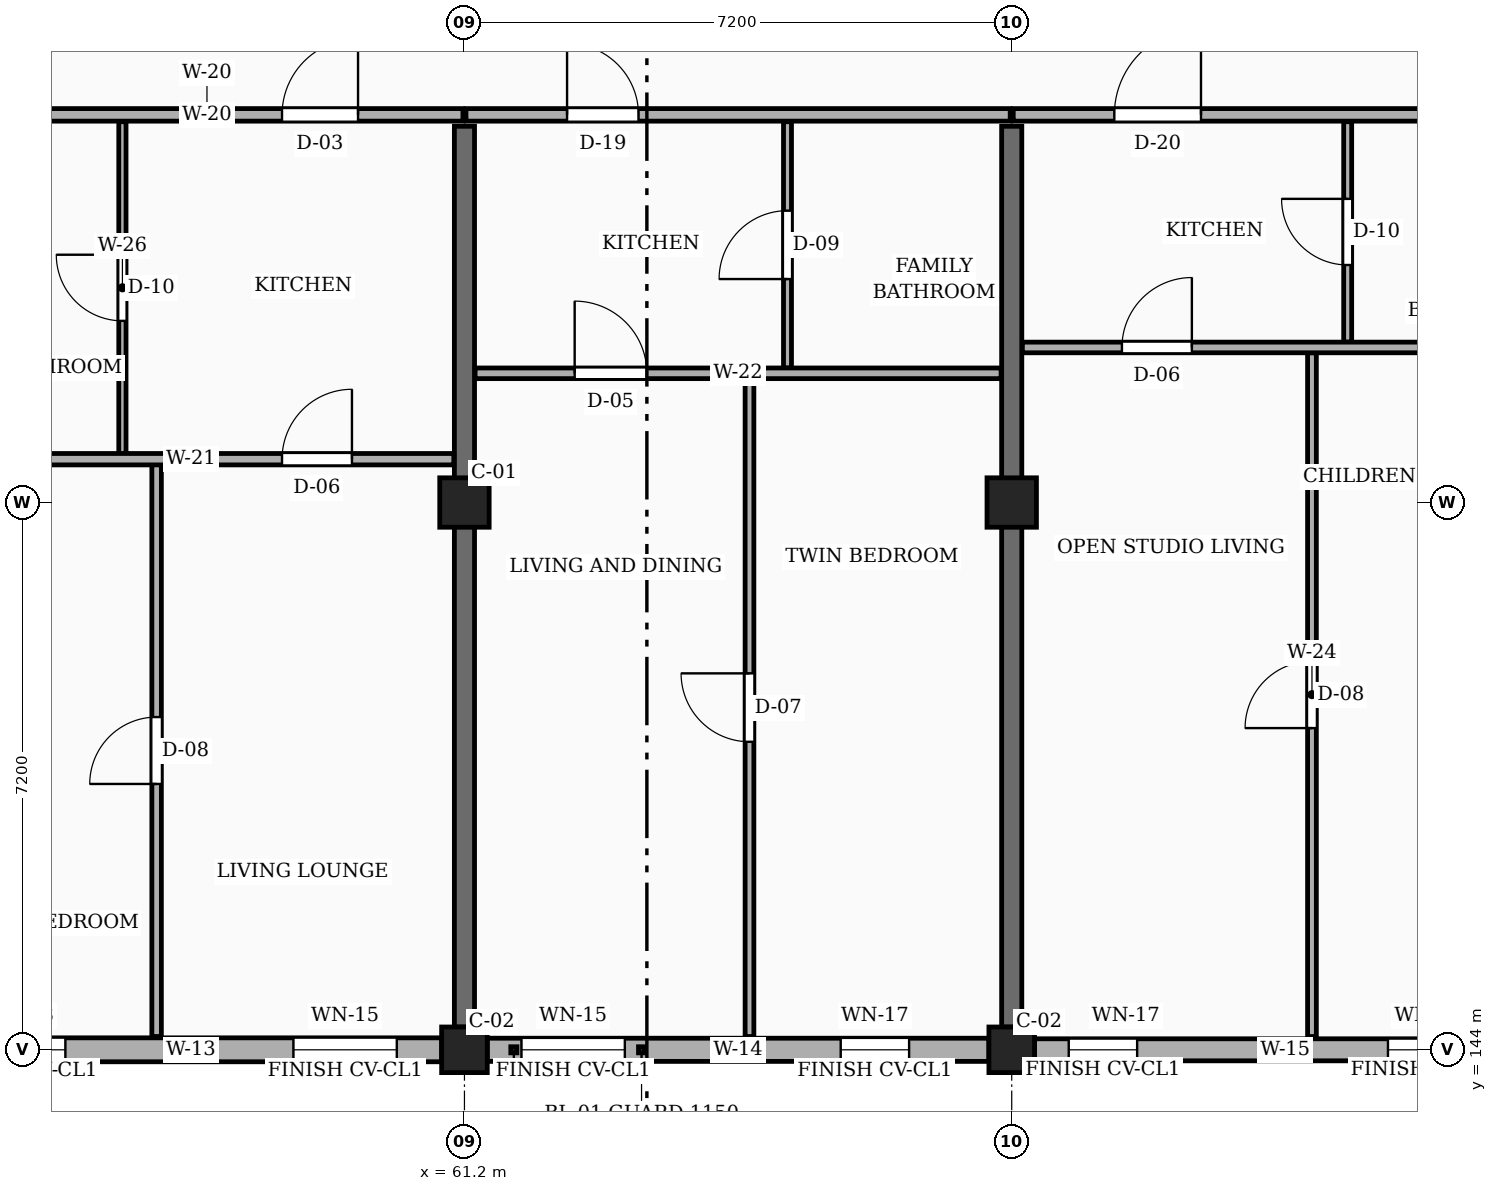
"""IFC4 building model, lengths in metres.
Left out: names, types, materials, properties, quantities, classifications, styles, units other than length and angle.
Written with IfcOpenShell. Run it as: python <this file> out.ifc"""

import sys

from ifc_helpers import new_model, si_unit, direction, frame, frame_2d, origin, origin_2d, place, context, subcontext, project, spatial, rectangle, extrude, element, fill, save


model = new_model("IFC4")
c1 = context("Model", 3, precision=1e-05, world=origin(), true_north=direction((0.0, 1.0)))
c2 = subcontext(c1, "Body", "Model", "MODEL_VIEW")
j1 = project(units=[si_unit("LENGTHUNIT", "METRE"), si_unit("PLANEANGLEUNIT", "RADIAN")], contexts=[c1])
p1 = place(None, origin())
s1 = spatial("IfcSite", under=j1, at=p1, CompositionType="ELEMENT")
p2 = place(p1, origin())
s2 = spatial("IfcBuilding", under=s1, at=p2, CompositionType="ELEMENT")
p3 = place(p2, frame((0.0, 0.0, 7.65)))
s3 = spatial("IfcBuildingStorey", under=s2, at=p3, CompositionType="ELEMENT", Elevation=7.65)
p4 = place(p3, frame((61.2, 144.0, 0.0), z_axis=(0.0, 0.0, 1.0), x_axis=(1.0, 0.0, 0.0)))
e1 = element("IfcColumn", 1, at=p4, inside=s3, PredefinedType="COLUMN", context=c2, shape_type="SweptSolid", body=[
    extrude(rectangle(XDim=0.6, YDim=0.6, at=origin_2d()), origin(), (0.0, 0.0, 1.0), 3.15),
])
p5 = place(p3, frame((61.2, 151.2, 0.0), z_axis=(0.0, 0.0, 1.0), x_axis=(1.0, 0.0, 0.0)))
e2 = element("IfcColumn", 2, at=p5, inside=s3, PredefinedType="COLUMN", context=c2, shape_type="SweptSolid", body=[
    extrude(rectangle(XDim=0.65, YDim=0.65, at=origin_2d()), origin(), (0.0, 0.0, 1.0), 3.15),
])
p6 = place(p3, frame((68.4, 144.0, 0.0), z_axis=(0.0, 0.0, 1.0), x_axis=(1.0, 0.0, 0.0)))
e3 = element("IfcColumn", 3, at=p6, inside=s3, PredefinedType="COLUMN", context=c2, shape_type="SweptSolid", body=[
    extrude(rectangle(XDim=0.6, YDim=0.6, at=origin_2d()), origin(), (0.0, 0.0, 1.0), 3.15),
])
p7 = place(p3, frame((68.4, 151.2, 0.0), z_axis=(0.0, 0.0, 1.0), x_axis=(1.0, 0.0, 0.0)))
e4 = element("IfcColumn", 4, at=p7, inside=s3, PredefinedType="COLUMN", context=c2, shape_type="SweptSolid", body=[
    extrude(rectangle(XDim=0.65, YDim=0.65, at=origin_2d()), origin(), (0.0, 0.0, 1.0), 3.15),
])
for number, where, z_axis, x_axis in (
    (5, (61.2, 144.3, 0.0), (0.0, 0.0, 1.0), (0.0, 1.0, 0.0)),
    (6, (68.4, 144.3, 0.0), (0.0, 0.0, 1.0), (0.0, 1.0, 0.0)),
):
    element("IfcWall", number, at=place(p3, frame(where, z_axis=z_axis, x_axis=x_axis)), inside=s3, PredefinedType="SOLIDWALL", context=c2, shape_type="SweptSolid", body=[
        extrude(rectangle(XDim=11.85, YDim=0.265, at=frame_2d((5.925, 0.0))), origin(), (0.0, 0.0, 1.0), 2.185),
    ])
p8 = place(p3, frame((54.3, 144.0, 0.0), z_axis=(0.0, 0.0, 1.0), x_axis=(1.0, 0.0, 0.0)))
e7 = element("IfcWall", 7, at=p8, inside=s3, PredefinedType="SOLIDWALL", context=c2, shape_type="SweptSolid", body=[
    extrude(rectangle(XDim=6.6, YDim=0.315, at=frame_2d((3.3, 0.0))), origin(), (0.0, 0.0, 1.0), 2.455),
])
p9 = place(p8, frame((0.45, 0.0, 0.78)))
e8 = element("IfcOpeningElement", 8, at=p9, cuts=e7, PredefinedType="OPENING", context=c2, shape_type="SweptSolid", body=[
    extrude(rectangle(XDim=1.2, YDim=1.26, at=frame_2d((0.6, 0.63))), frame((0.0, 0.167, 0.0), z_axis=(0.0, -1.0, 0.0), x_axis=(1.0, 0.0, 0.0)), (0.0, 0.0, 1.0), 0.335),
])
p10 = place(p8, frame((4.65, 0.0, 0.78)))
e9 = element("IfcOpeningElement", 9, at=p10, cuts=e7, PredefinedType="OPENING", context=c2, shape_type="SweptSolid", body=[
    extrude(rectangle(XDim=1.36, YDim=1.26, at=frame_2d((0.68, 0.63))), frame((0.0, 0.167, 0.0), z_axis=(0.0, -1.0, 0.0), x_axis=(1.0, 0.0, 0.0)), (0.0, 0.0, 1.0), 0.335),
])
p11 = place(p3, frame((61.5, 144.0, 0.0), z_axis=(0.0, 0.0, 1.0), x_axis=(1.0, 0.0, 0.0)))
e10 = element("IfcWall", 10, at=p11, inside=s3, PredefinedType="SOLIDWALL", context=c2, shape_type="SweptSolid", body=[
    extrude(rectangle(XDim=6.6, YDim=0.305, at=frame_2d((3.3, 0.0))), origin(), (0.0, 0.0, 1.0), 2.455),
])
p12 = place(p11, frame((0.45, 0.0, 0.78)))
e11 = element("IfcOpeningElement", 11, at=p12, cuts=e10, PredefinedType="OPENING", context=c2, shape_type="SweptSolid", body=[
    extrude(rectangle(XDim=1.36, YDim=1.26, at=frame_2d((0.68, 0.63))), frame((0.0, 0.163, 0.0), z_axis=(0.0, -1.0, 0.0), x_axis=(1.0, 0.0, 0.0)), (0.0, 0.0, 1.0), 0.325),
])
p13 = place(p11, frame((4.65, 0.0, 0.78)))
e12 = element("IfcOpeningElement", 12, at=p13, cuts=e10, PredefinedType="OPENING", context=c2, shape_type="SweptSolid", body=[
    extrude(rectangle(XDim=0.9, YDim=1.36, at=frame_2d((0.45, 0.68))), frame((0.0, 0.163, 0.0), z_axis=(0.0, -1.0, 0.0), x_axis=(1.0, 0.0, 0.0)), (0.0, 0.0, 1.0), 0.325),
])
p14 = place(p3, frame((68.7, 144.0, 0.0), z_axis=(0.0, 0.0, 1.0), x_axis=(1.0, 0.0, 0.0)))
e13 = element("IfcWall", 13, at=p14, inside=s3, PredefinedType="SOLIDWALL", context=c2, shape_type="SweptSolid", body=[
    extrude(rectangle(XDim=6.6, YDim=0.29, at=frame_2d((3.3, 0.0))), origin(), (0.0, 0.0, 1.0), 2.455),
])
p15 = place(p14, frame((0.45, 0.0, 0.78)))
e14 = element("IfcOpeningElement", 14, at=p15, cuts=e13, PredefinedType="OPENING", context=c2, shape_type="SweptSolid", body=[
    extrude(rectangle(XDim=0.9, YDim=1.36, at=frame_2d((0.45, 0.68))), frame((0.0, 0.155, 0.0), z_axis=(0.0, -1.0, 0.0), x_axis=(1.0, 0.0, 0.0)), (0.0, 0.0, 1.0), 0.31),
])
p16 = place(p14, frame((4.65, 0.0, 0.78)))
e15 = element("IfcOpeningElement", 15, at=p16, cuts=e13, PredefinedType="OPENING", context=c2, shape_type="SweptSolid", body=[
    extrude(rectangle(XDim=1.06, YDim=1.36, at=frame_2d((0.53, 0.68))), frame((0.0, 0.155, 0.0), z_axis=(0.0, -1.0, 0.0), x_axis=(1.0, 0.0, 0.0)), (0.0, 0.0, 1.0), 0.31),
])
p17 = place(p3, frame((54.02, 156.3, 0.0), z_axis=(0.0, 0.0, 1.0), x_axis=(1.0, 0.0, 0.0)))
e16 = element("IfcWall", 16, at=p17, inside=s3, PredefinedType="PARTITIONING", context=c2, shape_type="SweptSolid", body=[
    extrude(rectangle(XDim=7.16, YDim=0.165, at=frame_2d((3.58, 0.0))), origin(), (0.0, 0.0, 1.0), 2.32),
])
p18 = place(p17, frame((4.78, 0.0, 0.0)))
e17 = element("IfcOpeningElement", 17, at=p18, cuts=e16, PredefinedType="OPENING", context=c2, shape_type="SweptSolid", body=[
    extrude(rectangle(XDim=1.0, YDim=2.15, at=frame_2d((0.5, 1.075))), frame((0.0, 0.093, 0.0), z_axis=(0.0, -1.0, 0.0), x_axis=(1.0, 0.0, 0.0)), (0.0, 0.0, 1.0), 0.185),
])
p19 = place(p3, frame((61.22, 156.3, 0.0), z_axis=(0.0, 0.0, 1.0), x_axis=(1.0, 0.0, 0.0)))
e18 = element("IfcWall", 18, at=p19, inside=s3, PredefinedType="PARTITIONING", context=c2, shape_type="SweptSolid", body=[
    extrude(rectangle(XDim=7.16, YDim=0.165, at=frame_2d((3.58, 0.0))), origin(), (0.0, 0.0, 1.0), 2.32),
])
p20 = place(p19, frame((1.33, 0.0, 0.0)))
e19 = element("IfcOpeningElement", 19, at=p20, cuts=e18, PredefinedType="OPENING", context=c2, shape_type="SweptSolid", body=[
    extrude(rectangle(XDim=0.94, YDim=2.12, at=frame_2d((0.47, 1.06))), frame((0.0, 0.093, 0.0), z_axis=(0.0, -1.0, 0.0), x_axis=(1.0, 0.0, 0.0)), (0.0, 0.0, 1.0), 0.185),
])
p21 = place(p3, frame((68.42, 156.3, 0.0), z_axis=(0.0, 0.0, 1.0), x_axis=(1.0, 0.0, 0.0)))
e20 = element("IfcWall", 20, at=p21, inside=s3, PredefinedType="PARTITIONING", context=c2, shape_type="SweptSolid", body=[
    extrude(rectangle(XDim=7.005, YDim=0.165, at=frame_2d((3.502, 0.0))), origin(), (0.0, 0.0, 1.0), 2.32),
])
p22 = place(p21, frame((1.33, 0.0, 0.0)))
e21 = element("IfcOpeningElement", 21, at=p22, cuts=e20, PredefinedType="OPENING", context=c2, shape_type="SweptSolid", body=[
    extrude(rectangle(XDim=1.14, YDim=2.18, at=frame_2d((0.57, 1.09))), frame((0.0, 0.093, 0.0), z_axis=(0.0, -1.0, 0.0), x_axis=(1.0, 0.0, 0.0)), (0.0, 0.0, 1.0), 0.185),
])
p23 = place(p3, frame((57.15, 144.175, 0.0), z_axis=(0.0, 0.0, 1.0), x_axis=(0.0, 1.0, 0.0)))
e22 = element("IfcWall", 22, at=p23, inside=s3, PredefinedType="PARTITIONING", context=c2, shape_type="SweptSolid", body=[
    extrude(rectangle(XDim=7.525, YDim=0.125, at=frame_2d((3.762, 0.0))), origin(), (0.0, 0.0, 1.0), 2.32),
])
p24 = place(p23, frame((3.323, 0.0, 0.0)))
e23 = element("IfcOpeningElement", 23, at=p24, cuts=e22, PredefinedType="OPENING", context=c2, shape_type="SweptSolid", body=[
    extrude(rectangle(XDim=0.88, YDim=2.08, at=frame_2d((0.44, 1.04))), frame((0.0, 0.073, 0.0), z_axis=(0.0, -1.0, 0.0), x_axis=(1.0, 0.0, 0.0)), (0.0, 0.0, 1.0), 0.145),
])
p25 = place(p3, frame((56.7, 151.84, 0.0), z_axis=(0.0, 0.0, 1.0), x_axis=(0.0, 1.0, 0.0)))
e24 = element("IfcWall", 24, at=p25, inside=s3, PredefinedType="PARTITIONING", context=c2, shape_type="SweptSolid", body=[
    extrude(rectangle(XDim=4.37, YDim=0.095, at=frame_2d((2.185, 0.0))), origin(), (0.0, 0.0, 1.0), 2.32),
])
p26 = place(p25, frame((1.75, 0.0, 0.0)))
e25 = element("IfcOpeningElement", 25, at=p26, cuts=e24, PredefinedType="OPENING", context=c2, shape_type="SweptSolid", body=[
    extrude(rectangle(XDim=0.87, YDim=2.05, at=frame_2d((0.435, 1.025))), frame((0.0, 0.058, 0.0), z_axis=(0.0, -1.0, 0.0), x_axis=(1.0, 0.0, 0.0)), (0.0, 0.0, 1.0), 0.115),
])
p27 = place(p3, frame((54.14, 151.77, 0.0), z_axis=(0.0, 0.0, 1.0), x_axis=(1.0, 0.0, 0.0)))
e26 = element("IfcWall", 26, at=p27, inside=s3, PredefinedType="PARTITIONING", context=c2, shape_type="SweptSolid", body=[
    extrude(rectangle(XDim=6.92, YDim=0.15, at=frame_2d((3.46, 0.0))), origin(), (0.0, 0.0, 1.0), 2.32),
])
p28 = place(p27, frame((4.66, 0.0, 0.0)))
e27 = element("IfcOpeningElement", 27, at=p28, cuts=e26, PredefinedType="OPENING", context=c2, shape_type="SweptSolid", body=[
    extrude(rectangle(XDim=0.92, YDim=2.1, at=frame_2d((0.46, 1.05))), frame((0.0, 0.085, 0.0), z_axis=(0.0, -1.0, 0.0), x_axis=(1.0, 0.0, 0.0)), (0.0, 0.0, 1.0), 0.17),
])
p29 = place(p3, frame((64.95, 144.175, 0.0), z_axis=(0.0, 0.0, 1.0), x_axis=(0.0, 1.0, 0.0)))
e28 = element("IfcWall", 28, at=p29, inside=s3, PredefinedType="PARTITIONING", context=c2, shape_type="SweptSolid", body=[
    extrude(rectangle(XDim=8.655, YDim=0.115, at=frame_2d((4.328, 0.0))), origin(), (0.0, 0.0, 1.0), 2.32),
])
p30 = place(p29, frame((3.877, 0.0, 0.0)))
e29 = element("IfcOpeningElement", 29, at=p30, cuts=e28, PredefinedType="OPENING", context=c2, shape_type="SweptSolid", body=[
    extrude(rectangle(XDim=0.9, YDim=2.1, at=frame_2d((0.45, 1.05))), frame((0.0, 0.067, 0.0), z_axis=(0.0, -1.0, 0.0), x_axis=(1.0, 0.0, 0.0)), (0.0, 0.0, 1.0), 0.135),
])
p31 = place(p3, frame((65.45, 152.97, 0.0), z_axis=(0.0, 0.0, 1.0), x_axis=(0.0, 1.0, 0.0)))
e30 = element("IfcWall", 30, at=p31, inside=s3, PredefinedType="PARTITIONING", context=c2, shape_type="SweptSolid", body=[
    extrude(rectangle(XDim=3.24, YDim=0.105, at=frame_2d((1.62, 0.0))), origin(), (0.0, 0.0, 1.0), 2.32),
])
p32 = place(p31, frame((1.17, 0.0, 0.0)))
e31 = element("IfcOpeningElement", 31, at=p32, cuts=e30, PredefinedType="OPENING", context=c2, shape_type="SweptSolid", body=[
    extrude(rectangle(XDim=0.9, YDim=2.05, at=frame_2d((0.45, 1.025))), frame((0.0, 0.062, 0.0), z_axis=(0.0, -1.0, 0.0), x_axis=(1.0, 0.0, 0.0)), (0.0, 0.0, 1.0), 0.125),
])
p33 = place(p3, frame((61.34, 152.9, 0.0), z_axis=(0.0, 0.0, 1.0), x_axis=(1.0, 0.0, 0.0)))
e32 = element("IfcWall", 32, at=p33, inside=s3, PredefinedType="PARTITIONING", context=c2, shape_type="SweptSolid", body=[
    extrude(rectangle(XDim=6.92, YDim=0.14, at=frame_2d((3.46, 0.0))), origin(), (0.0, 0.0, 1.0), 2.32),
])
p34 = place(p33, frame((1.31, 0.0, 0.0)))
e33 = element("IfcOpeningElement", 33, at=p34, cuts=e32, PredefinedType="OPENING", context=c2, shape_type="SweptSolid", body=[
    extrude(rectangle(XDim=0.95, YDim=2.1, at=frame_2d((0.475, 1.05))), frame((0.0, 0.08, 0.0), z_axis=(0.0, -1.0, 0.0), x_axis=(1.0, 0.0, 0.0)), (0.0, 0.0, 1.0), 0.16),
])
p35 = place(p3, frame((72.35, 144.175, 0.0), z_axis=(0.0, 0.0, 1.0), x_axis=(0.0, 1.0, 0.0)))
e34 = element("IfcWall", 34, at=p35, inside=s3, PredefinedType="PARTITIONING", context=c2, shape_type="SweptSolid", body=[
    extrude(rectangle(XDim=8.995, YDim=0.115, at=frame_2d((4.498, 0.0))), origin(), (0.0, 0.0, 1.0), 2.32),
])
p36 = place(p35, frame((4.058, 0.0, 0.0)))
e35 = element("IfcOpeningElement", 35, at=p36, cuts=e34, PredefinedType="OPENING", context=c2, shape_type="SweptSolid", body=[
    extrude(rectangle(XDim=0.88, YDim=2.08, at=frame_2d((0.44, 1.04))), frame((0.0, 0.067, 0.0), z_axis=(0.0, -1.0, 0.0), x_axis=(1.0, 0.0, 0.0)), (0.0, 0.0, 1.0), 0.135),
])
p37 = place(p3, frame((72.82, 153.31, 0.0), z_axis=(0.0, 0.0, 1.0), x_axis=(0.0, 1.0, 0.0)))
e36 = element("IfcWall", 36, at=p37, inside=s3, PredefinedType="PARTITIONING", context=c2, shape_type="SweptSolid", body=[
    extrude(rectangle(XDim=2.9, YDim=0.105, at=frame_2d((1.45, 0.0))), origin(), (0.0, 0.0, 1.0), 2.32),
])
p38 = place(p37, frame((1.015, 0.0, 0.0)))
e37 = element("IfcOpeningElement", 37, at=p38, cuts=e36, PredefinedType="OPENING", context=c2, shape_type="SweptSolid", body=[
    extrude(rectangle(XDim=0.87, YDim=2.05, at=frame_2d((0.435, 1.025))), frame((0.0, 0.062, 0.0), z_axis=(0.0, -1.0, 0.0), x_axis=(1.0, 0.0, 0.0)), (0.0, 0.0, 1.0), 0.125),
])
p39 = place(p3, frame((68.54, 153.24, 0.0), z_axis=(0.0, 0.0, 1.0), x_axis=(1.0, 0.0, 0.0)))
e38 = element("IfcWall", 38, at=p39, inside=s3, PredefinedType="PARTITIONING", context=c2, shape_type="SweptSolid", body=[
    extrude(rectangle(XDim=6.885, YDim=0.14, at=frame_2d((3.442, 0.0))), origin(), (0.0, 0.0, 1.0), 2.32),
])
p40 = place(p39, frame((1.31, 0.0, 0.0)))
e39 = element("IfcOpeningElement", 39, at=p40, cuts=e38, PredefinedType="OPENING", context=c2, shape_type="SweptSolid", body=[
    extrude(rectangle(XDim=0.92, YDim=2.1, at=frame_2d((0.46, 1.05))), frame((0.0, 0.08, 0.0), z_axis=(0.0, -1.0, 0.0), x_axis=(1.0, 0.0, 0.0)), (0.0, 0.0, 1.0), 0.16),
])
p41 = place(p9, origin())
e40 = element("IfcWindow", 40, at=p41, inside=s3, PartitioningType="SINGLE_PANEL", PredefinedType="WINDOW", context=c2, shape_type="SweptSolid", body=[
    extrude(rectangle(XDim=1.2, YDim=1.26, at=frame_2d((0.6, 0.63))), frame((0.0, 0.03, 0.0), z_axis=(0.0, -1.0, 0.0), x_axis=(1.0, 0.0, 0.0)), (0.0, 0.0, 1.0), 0.06),
])
fill(e8, e40)
p42 = place(p10, origin())
e41 = element("IfcWindow", 41, at=p42, inside=s3, PartitioningType="SINGLE_PANEL", PredefinedType="WINDOW", context=c2, shape_type="SweptSolid", body=[
    extrude(rectangle(XDim=1.36, YDim=1.26, at=frame_2d((0.68, 0.63))), frame((0.0, 0.03, 0.0), z_axis=(0.0, -1.0, 0.0), x_axis=(1.0, 0.0, 0.0)), (0.0, 0.0, 1.0), 0.06),
])
fill(e9, e41)
p43 = place(p12, origin())
e42 = element("IfcWindow", 42, at=p43, inside=s3, PartitioningType="SINGLE_PANEL", PredefinedType="WINDOW", context=c2, shape_type="SweptSolid", body=[
    extrude(rectangle(XDim=1.36, YDim=1.26, at=frame_2d((0.68, 0.63))), frame((0.0, 0.03, 0.0), z_axis=(0.0, -1.0, 0.0), x_axis=(1.0, 0.0, 0.0)), (0.0, 0.0, 1.0), 0.06),
])
fill(e11, e42)
p44 = place(p13, origin())
e43 = element("IfcWindow", 43, at=p44, inside=s3, PartitioningType="SINGLE_PANEL", PredefinedType="WINDOW", context=c2, shape_type="SweptSolid", body=[
    extrude(rectangle(XDim=0.9, YDim=1.36, at=frame_2d((0.45, 0.68))), frame((0.0, 0.03, 0.0), z_axis=(0.0, -1.0, 0.0), x_axis=(1.0, 0.0, 0.0)), (0.0, 0.0, 1.0), 0.06),
])
fill(e12, e43)
p45 = place(p15, origin())
e44 = element("IfcWindow", 44, at=p45, inside=s3, PartitioningType="SINGLE_PANEL", PredefinedType="WINDOW", context=c2, shape_type="SweptSolid", body=[
    extrude(rectangle(XDim=0.9, YDim=1.36, at=frame_2d((0.45, 0.68))), frame((0.0, 0.03, 0.0), z_axis=(0.0, -1.0, 0.0), x_axis=(1.0, 0.0, 0.0)), (0.0, 0.0, 1.0), 0.06),
])
fill(e14, e44)
p46 = place(p16, origin())
e45 = element("IfcWindow", 45, at=p46, inside=s3, PartitioningType="SINGLE_PANEL", PredefinedType="WINDOW", context=c2, shape_type="SweptSolid", body=[
    extrude(rectangle(XDim=1.06, YDim=1.36, at=frame_2d((0.53, 0.68))), frame((0.0, 0.03, 0.0), z_axis=(0.0, -1.0, 0.0), x_axis=(1.0, 0.0, 0.0)), (0.0, 0.0, 1.0), 0.06),
])
fill(e15, e45)
p47 = place(p18, origin())
e46 = element("IfcDoor", 46, at=p47, inside=s3, OperationType="SINGLE_SWING_RIGHT", PredefinedType="DOOR", context=c2, shape_type="SweptSolid", body=[
    extrude(rectangle(XDim=1.0, YDim=2.15, at=frame_2d((0.5, 1.075))), frame((0.0, 0.025, 0.0), z_axis=(0.0, -1.0, 0.0), x_axis=(1.0, 0.0, 0.0)), (0.0, 0.0, 1.0), 0.05),
])
fill(e17, e46)
p48 = place(p20, origin())
e47 = element("IfcDoor", 47, at=p48, inside=s3, OperationType="SINGLE_SWING_LEFT", PredefinedType="DOOR", context=c2, shape_type="SweptSolid", body=[
    extrude(rectangle(XDim=0.94, YDim=2.12, at=frame_2d((0.47, 1.06))), frame((0.0, 0.025, 0.0), z_axis=(0.0, -1.0, 0.0), x_axis=(1.0, 0.0, 0.0)), (0.0, 0.0, 1.0), 0.05),
])
fill(e19, e47)
p49 = place(p22, origin())
e48 = element("IfcDoor", 48, at=p49, inside=s3, OperationType="SINGLE_SWING_RIGHT", PredefinedType="DOOR", context=c2, shape_type="SweptSolid", body=[
    extrude(rectangle(XDim=1.14, YDim=2.18, at=frame_2d((0.57, 1.09))), frame((0.0, 0.025, 0.0), z_axis=(0.0, -1.0, 0.0), x_axis=(1.0, 0.0, 0.0)), (0.0, 0.0, 1.0), 0.05),
])
fill(e21, e48)
p50 = place(p24, origin())
e49 = element("IfcDoor", 49, at=p50, inside=s3, OperationType="SINGLE_SWING_LEFT", PredefinedType="DOOR", context=c2, shape_type="SweptSolid", body=[
    extrude(rectangle(XDim=0.88, YDim=2.08, at=frame_2d((0.44, 1.04))), frame((0.0, 0.025, 0.0), z_axis=(0.0, -1.0, 0.0), x_axis=(1.0, 0.0, 0.0)), (0.0, 0.0, 1.0), 0.05),
])
fill(e23, e49)
p51 = place(p26, origin())
e50 = element("IfcDoor", 50, at=p51, inside=s3, OperationType="SINGLE_SWING_RIGHT", PredefinedType="DOOR", context=c2, shape_type="SweptSolid", body=[
    extrude(rectangle(XDim=0.87, YDim=2.05, at=frame_2d((0.435, 1.025))), frame((0.0, 0.025, 0.0), z_axis=(0.0, -1.0, 0.0), x_axis=(1.0, 0.0, 0.0)), (0.0, 0.0, 1.0), 0.05),
])
fill(e25, e50)
p52 = place(p28, origin())
e51 = element("IfcDoor", 51, at=p52, inside=s3, OperationType="SINGLE_SWING_RIGHT", PredefinedType="DOOR", context=c2, shape_type="SweptSolid", body=[
    extrude(rectangle(XDim=0.92, YDim=2.1, at=frame_2d((0.46, 1.05))), frame((0.0, 0.025, 0.0), z_axis=(0.0, -1.0, 0.0), x_axis=(1.0, 0.0, 0.0)), (0.0, 0.0, 1.0), 0.05),
])
fill(e27, e51)
p53 = place(p30, origin())
e52 = element("IfcDoor", 52, at=p53, inside=s3, OperationType="SINGLE_SWING_RIGHT", PredefinedType="DOOR", context=c2, shape_type="SweptSolid", body=[
    extrude(rectangle(XDim=0.9, YDim=2.1, at=frame_2d((0.45, 1.05))), frame((0.0, 0.025, 0.0), z_axis=(0.0, -1.0, 0.0), x_axis=(1.0, 0.0, 0.0)), (0.0, 0.0, 1.0), 0.05),
])
fill(e29, e52)
p54 = place(p32, origin())
e53 = element("IfcDoor", 53, at=p54, inside=s3, OperationType="SINGLE_SWING_LEFT", PredefinedType="DOOR", context=c2, shape_type="SweptSolid", body=[
    extrude(rectangle(XDim=0.9, YDim=2.05, at=frame_2d((0.45, 1.025))), frame((0.0, 0.025, 0.0), z_axis=(0.0, -1.0, 0.0), x_axis=(1.0, 0.0, 0.0)), (0.0, 0.0, 1.0), 0.05),
])
fill(e31, e53)
p55 = place(p34, origin())
e54 = element("IfcDoor", 54, at=p55, inside=s3, OperationType="SINGLE_SWING_LEFT", PredefinedType="DOOR", context=c2, shape_type="SweptSolid", body=[
    extrude(rectangle(XDim=0.95, YDim=2.1, at=frame_2d((0.475, 1.05))), frame((0.0, 0.025, 0.0), z_axis=(0.0, -1.0, 0.0), x_axis=(1.0, 0.0, 0.0)), (0.0, 0.0, 1.0), 0.05),
])
fill(e33, e54)
p56 = place(p36, origin())
e55 = element("IfcDoor", 55, at=p56, inside=s3, OperationType="SINGLE_SWING_LEFT", PredefinedType="DOOR", context=c2, shape_type="SweptSolid", body=[
    extrude(rectangle(XDim=0.88, YDim=2.08, at=frame_2d((0.44, 1.04))), frame((0.0, 0.025, 0.0), z_axis=(0.0, -1.0, 0.0), x_axis=(1.0, 0.0, 0.0)), (0.0, 0.0, 1.0), 0.05),
])
fill(e35, e55)
p57 = place(p38, origin())
e56 = element("IfcDoor", 56, at=p57, inside=s3, OperationType="SINGLE_SWING_RIGHT", PredefinedType="DOOR", context=c2, shape_type="SweptSolid", body=[
    extrude(rectangle(XDim=0.87, YDim=2.05, at=frame_2d((0.435, 1.025))), frame((0.0, 0.025, 0.0), z_axis=(0.0, -1.0, 0.0), x_axis=(1.0, 0.0, 0.0)), (0.0, 0.0, 1.0), 0.05),
])
fill(e37, e56)
p58 = place(p40, origin())
e57 = element("IfcDoor", 57, at=p58, inside=s3, OperationType="SINGLE_SWING_RIGHT", PredefinedType="DOOR", context=c2, shape_type="SweptSolid", body=[
    extrude(rectangle(XDim=0.92, YDim=2.1, at=frame_2d((0.46, 1.05))), frame((0.0, 0.025, 0.0), z_axis=(0.0, -1.0, 0.0), x_axis=(1.0, 0.0, 0.0)), (0.0, 0.0, 1.0), 0.05),
])
fill(e39, e57)
save(model, sys.argv[1])
